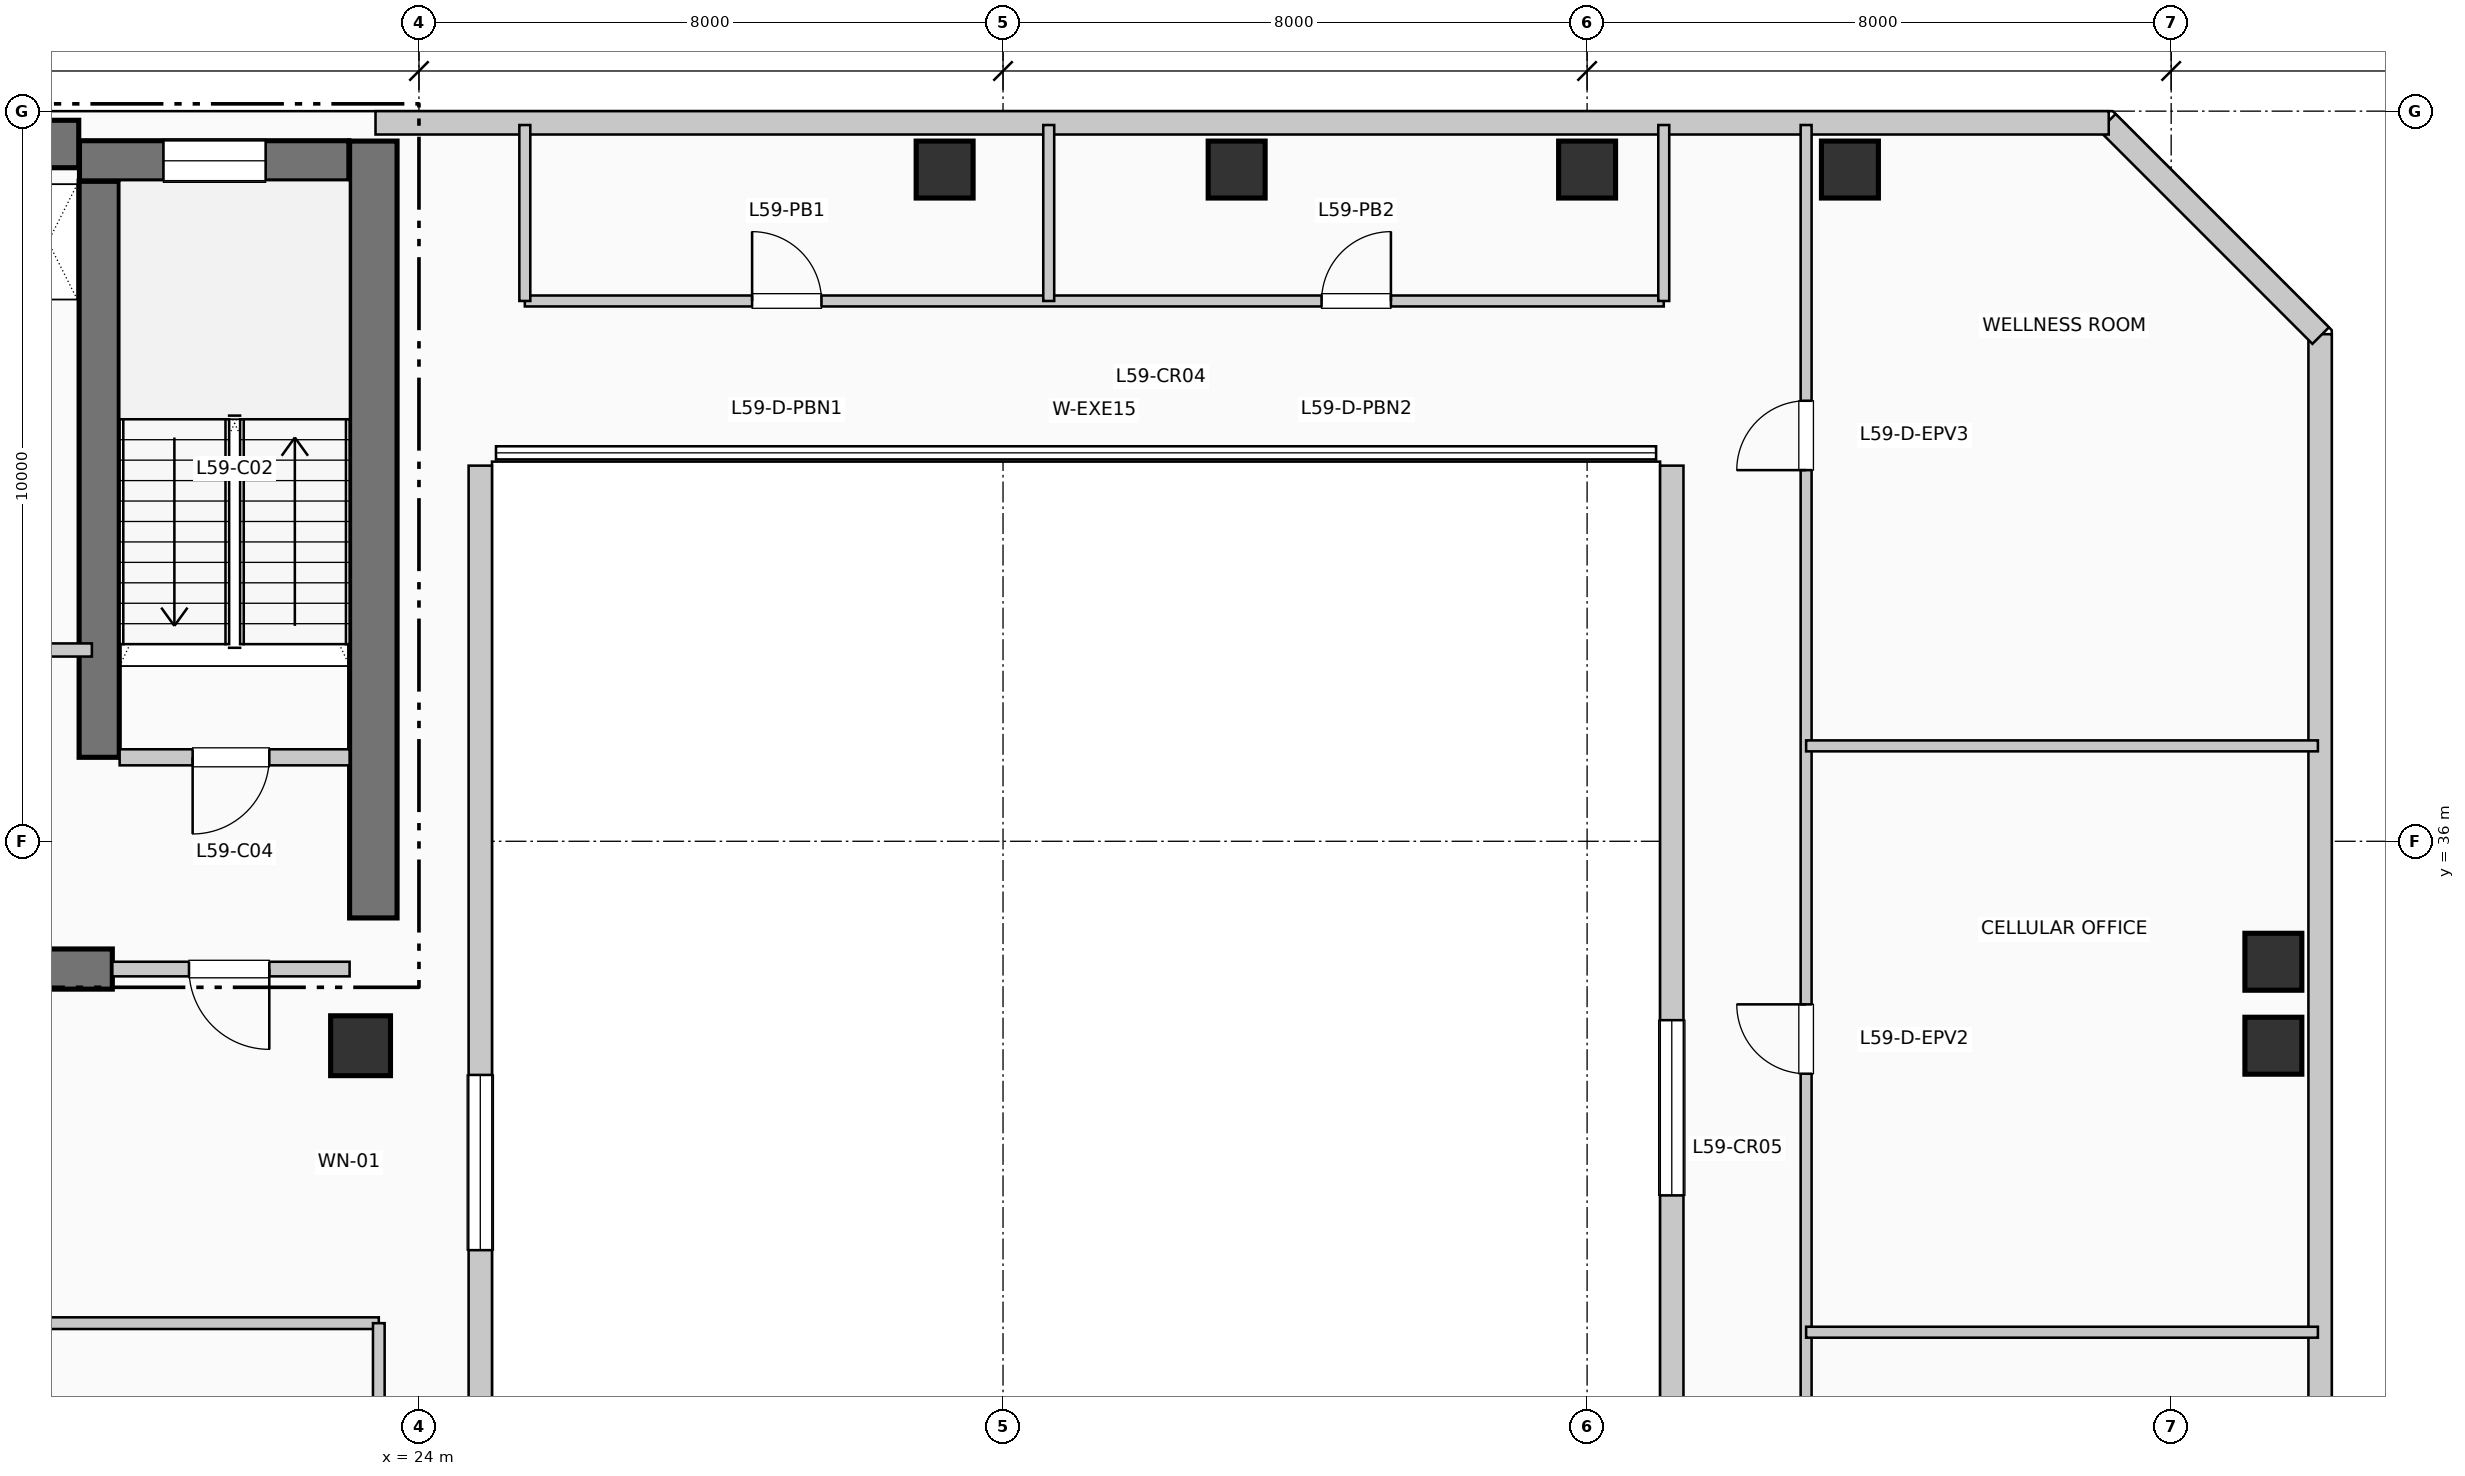
"""IFC4 building model, lengths in metres.
Left out: names, types, materials, properties, quantities, classifications, styles, units other than length and angle.
Written with IfcOpenShell. Run it as: python <this file> out.ifc"""

import sys

from ifc_helpers import new_model, si_unit, direction, frame, frame_2d, origin, origin_2d, place, context, subcontext, project, spatial, rectangle, extrude, element, fill, save


model = new_model("IFC4")
c1 = context("Model", 3, precision=1e-05, world=origin(), true_north=direction((0.0, 1.0)))
c2 = subcontext(c1, "Body", "Model", "MODEL_VIEW")
j1 = project(units=[si_unit("LENGTHUNIT", "METRE"), si_unit("PLANEANGLEUNIT", "RADIAN")], contexts=[c1])
p1 = place(None, origin())
s1 = spatial("IfcSite", under=j1, at=p1, CompositionType="ELEMENT")
p2 = place(p1, origin())
s2 = spatial("IfcBuilding", under=s1, at=p2, CompositionType="ELEMENT")
p3 = place(p2, frame((0.0, 0.0, 243.54)))
s3 = spatial("IfcBuildingStorey", under=s2, at=p3, CompositionType="ELEMENT", Elevation=243.54)
p4 = place(p3, frame((5.36, 45.55, 0.0), z_axis=(0.0, 0.0, 1.0), x_axis=(1.0, 0.0, 0.0)))
e1 = element("IfcWall", 1, at=p4, inside=s3, PredefinedType="SHEAR", context=c2, shape_type="SweptSolid", body=[
    extrude(rectangle(XDim=13.98, YDim=0.65, at=frame_2d((6.99, 0.0))), origin(), (0.0, 0.0, 1.0), 3.96),
])
p5 = place(p3, frame((23.375, 34.95, 0.0), z_axis=(0.0, 0.0, 1.0), x_axis=(0.0, 1.0, 0.0)))
e2 = element("IfcWall", 2, at=p5, inside=s3, PredefinedType="SHEAR", context=c2, shape_type="SweptSolid", body=[
    extrude(rectangle(XDim=10.64, YDim=0.65, at=frame_2d((5.32, 0.0))), origin(), (0.0, 0.0, 1.0), 3.96),
])
p6 = place(p3, frame((13.68, 34.25, 0.0), z_axis=(0.0, 0.0, 1.0), x_axis=(1.0, 0.0, 0.0)))
e3 = element("IfcWall", 3, at=p6, inside=s3, PredefinedType="SHEAR", context=c2, shape_type="SweptSolid", body=[
    extrude(rectangle(XDim=6.12, YDim=0.55, at=frame_2d((3.06, 0.0))), origin(), (0.0, 0.0, 1.0), 3.96),
])
p7 = place(p3, frame((19.62, 37.15, 0.0), z_axis=(0.0, 0.0, 1.0), x_axis=(0.0, 1.0, 0.0)))
e4 = element("IfcWall", 4, at=p7, inside=s3, PredefinedType="SHEAR", context=c2, shape_type="SweptSolid", body=[
    extrude(rectangle(XDim=7.89, YDim=0.55, at=frame_2d((3.945, 0.0))), origin(), (0.0, 0.0, 1.0), 3.96),
])
p8 = place(p3, frame((19.35, 45.32, 0.0), z_axis=(0.0, 0.0, 1.0), x_axis=(1.0, 0.0, 0.0)))
e5 = element("IfcWall", 5, at=p8, inside=s3, PredefinedType="SHEAR", context=c2, shape_type="SweptSolid", body=[
    extrude(rectangle(XDim=3.69, YDim=0.55, at=frame_2d((1.845, 0.0))), origin(), (0.0, 0.0, 1.0), 3.96),
])
p9 = place(p8, frame((1.15, 0.0, 1.05)))
e6 = element("IfcOpeningElement", 6, at=p9, cuts=e5, PredefinedType="OPENING", context=c2, shape_type="SweptSolid", body=[
    extrude(rectangle(XDim=1.4, YDim=1.8, at=frame_2d((0.7, 0.9))), frame((0.0, 0.285, 0.0), z_axis=(0.0, -1.0, 0.0), x_axis=(1.0, 0.0, 0.0)), (0.0, 0.0, 1.0), 0.57),
])
p10 = place(p3, frame((23.2, 33.2, 0.0), z_axis=(0.0, 0.0, 1.0), x_axis=(1.0, 0.0, 0.0)))
e7 = element("IfcColumn", 7, at=p10, inside=s3, PredefinedType="COLUMN", context=c2, shape_type="SweptSolid", body=[
    extrude(rectangle(XDim=0.82, YDim=0.82, at=origin_2d()), origin(), (0.0, 0.0, 1.0), 3.96),
])
for number, where, z_axis, x_axis in (
    (8, (31.2, 45.2, 0.0), (0.0, 0.0, 1.0), (1.0, 0.0, 0.0)),
    (9, (35.2, 45.2, 0.0), (0.0, 0.0, 1.0), (1.0, 0.0, 0.0)),
    (10, (40.0, 45.2, 0.0), (0.0, 0.0, 1.0), (1.0, 0.0, 0.0)),
    (11, (43.6, 45.2, 0.0), (0.0, 0.0, 1.0), (1.0, 0.0, 0.0)),
    (12, (49.4, 33.2, 0.0), (0.0, 0.0, 1.0), (1.0, 0.0, 0.0)),
    (13, (49.4, 34.35, 0.0), (0.0, 0.0, 1.0), (1.0, 0.0, 0.0)),
):
    element("IfcColumn", number, at=place(p3, frame(where, z_axis=z_axis, x_axis=x_axis)), inside=s3, PredefinedType="COLUMN", context=c2, shape_type="SweptSolid", body=[
        extrude(rectangle(XDim=0.78, YDim=0.78, at=origin_2d()), origin(), (0.0, 0.0, 1.0), 3.96),
    ])
p11 = place(p3, frame((24.84, 22.055, 0.0), z_axis=(0.0, 0.0, 1.0), x_axis=(0.0, 1.0, 0.0)))
e14 = element("IfcWall", 14, at=p11, inside=s3, PredefinedType="SOLIDWALL", context=c2, shape_type="SweptSolid", body=[
    extrude(rectangle(XDim=19.09, YDim=0.32, at=frame_2d((9.545, 0.0))), origin(), (0.0, 0.0, 1.0), 3.71),
])
p12 = place(p11, frame((8.345, 0.0, 0.85)))
e15 = element("IfcOpeningElement", 15, at=p12, cuts=e14, PredefinedType="OPENING", context=c2, shape_type="SweptSolid", body=[
    extrude(rectangle(XDim=2.4, YDim=2.05, at=frame_2d((1.2, 1.025))), frame((0.0, 0.17, 0.0), z_axis=(0.0, -1.0, 0.0), x_axis=(1.0, 0.0, 0.0)), (0.0, 0.0, 1.0), 0.34),
])
p13 = place(p3, frame((41.16, 41.145, 0.0), z_axis=(0.0, 0.0, 1.0), x_axis=(0.0, -1.0, 0.0)))
e16 = element("IfcWall", 16, at=p13, inside=s3, PredefinedType="SOLIDWALL", context=c2, shape_type="SweptSolid", body=[
    extrude(rectangle(XDim=17.59, YDim=0.32, at=frame_2d((8.795, 0.0))), origin(), (0.0, 0.0, 1.0), 3.71),
])
p14 = place(p13, frame((7.595, 0.0, 0.85)))
e17 = element("IfcOpeningElement", 17, at=p14, cuts=e16, PredefinedType="OPENING", context=c2, shape_type="SweptSolid", body=[
    extrude(rectangle(XDim=2.4, YDim=2.05, at=frame_2d((1.2, 1.025))), frame((0.0, 0.17, 0.0), z_axis=(0.0, -1.0, 0.0), x_axis=(1.0, 0.0, 0.0)), (0.0, 0.0, 1.0), 0.34),
])
p15 = place(p3, frame((50.04, 25.055, 0.0), z_axis=(0.0, 0.0, 1.0), x_axis=(0.0, 1.0, 0.0)))
e18 = element("IfcWall", 18, at=p15, inside=s3, PredefinedType="SOLIDWALL", context=c2, shape_type="SweptSolid", body=[
    extrude(rectangle(XDim=17.89, YDim=0.32, at=frame_2d((8.945, 0.0))), origin(), (0.0, 0.0, 1.0), 3.71),
])
p16 = place(p3, frame((50.048, 42.926, 0.0), z_axis=(0.0, 0.0, 1.0), x_axis=(-0.707136318428, 0.707077242712, 0.0)))
e19 = element("IfcWall", 19, at=p16, inside=s3, PredefinedType="SOLIDWALL", context=c2, shape_type="SweptSolid", body=[
    extrude(rectangle(XDim=4.133, YDim=0.32, at=frame_2d((2.066, 0.0))), origin(), (0.0, 0.0, 1.0), 3.71),
])
p17 = place(p3, frame((47.145, 45.84, 0.0), z_axis=(0.0, 0.0, 1.0), x_axis=(-1.0, 0.0, 0.0)))
e20 = element("IfcWall", 20, at=p17, inside=s3, PredefinedType="SOLIDWALL", context=c2, shape_type="SweptSolid", body=[
    extrude(rectangle(XDim=23.74, YDim=0.32, at=frame_2d((11.87, 0.0))), origin(), (0.0, 0.0, 1.0), 3.71),
])
p18 = place(p3, frame((19.9, 37.15, 0.0), z_axis=(0.0, 0.0, 1.0), x_axis=(1.0, 0.0, 0.0)))
e21 = element("IfcWall", 21, at=p18, inside=s3, PredefinedType="PARTITIONING", context=c2, shape_type="SweptSolid", body=[
    extrude(rectangle(XDim=3.15, YDim=0.22, at=frame_2d((1.575, 0.0))), origin(), (0.0, 0.0, 1.0), 3.71),
])
p19 = place(p18, frame((2.05, 0.0, 0.0), z_axis=(0.0, 0.0, 1.0), x_axis=(-1.0, 0.0, 0.0)))
e22 = element("IfcOpeningElement", 22, at=p19, cuts=e21, PredefinedType="OPENING", context=c2, shape_type="SweptSolid", body=[
    extrude(rectangle(XDim=1.05, YDim=2.15, at=frame_2d((0.525, 1.075))), frame((0.0, 0.12, 0.0), z_axis=(0.0, -1.0, 0.0), x_axis=(1.0, 0.0, 0.0)), (0.0, 0.0, 1.0), 0.24),
])
p20 = place(p3, frame((19.8, 34.25, 0.0), z_axis=(0.0, 0.0, 1.0), x_axis=(1.0, 0.0, 0.0)))
e23 = element("IfcWall", 23, at=p20, inside=s3, PredefinedType="PARTITIONING", context=c2, shape_type="SweptSolid", body=[
    extrude(rectangle(XDim=3.25, YDim=0.2, at=frame_2d((1.625, 0.0))), origin(), (0.0, 0.0, 1.0), 3.71),
])
p21 = place(p20, frame((2.15, 0.0, 0.0), z_axis=(0.0, 0.0, 1.0), x_axis=(-1.0, 0.0, 0.0)))
e24 = element("IfcOpeningElement", 24, at=p21, cuts=e23, PredefinedType="OPENING", context=c2, shape_type="SweptSolid", body=[
    extrude(rectangle(XDim=1.1, YDim=2.15, at=frame_2d((0.55, 1.075))), frame((0.0, 0.11, 0.0), z_axis=(0.0, -1.0, 0.0), x_axis=(1.0, 0.0, 0.0)), (0.0, 0.0, 1.0), 0.22),
])
p22 = place(p3, frame((17.68, 38.62, 0.0), z_axis=(0.0, 0.0, 1.0), x_axis=(1.0, 0.0, 0.0)))
e25 = element("IfcWall", 25, at=p22, inside=s3, PredefinedType="PARTITIONING", context=c2, shape_type="SweptSolid", body=[
    extrude(rectangle(XDim=1.84, YDim=0.18, at=frame_2d((0.92, 0.0))), origin(), (0.0, 0.0, 1.0), 3.71),
])
p23 = place(p22, frame((0.24, 0.0, 0.0)))
e26 = element("IfcOpeningElement", 26, at=p23, cuts=e25, PredefinedType="OPENING", context=c2, shape_type="SweptSolid", body=[
    extrude(rectangle(XDim=0.92, YDim=2.1, at=frame_2d((0.46, 1.05))), frame((0.0, 0.1, 0.0), z_axis=(0.0, -1.0, 0.0), x_axis=(1.0, 0.0, 0.0)), (0.0, 0.0, 1.0), 0.2),
])
p24 = place(p3, frame((9.04, 29.4, 0.0), z_axis=(0.0, 0.0, 1.0), x_axis=(1.0, 0.0, 0.0)))
e27 = element("IfcWall", 27, at=p24, inside=s3, PredefinedType="PARTITIONING", context=c2, shape_type="SweptSolid", body=[
    extrude(rectangle(XDim=14.41, YDim=0.16, at=frame_2d((7.205, 0.0))), origin(), (0.0, 0.0, 1.0), 3.365),
])
p25 = place(p3, frame((23.45, 6.84, 0.0), z_axis=(0.0, 0.0, 1.0), x_axis=(0.0, 1.0, 0.0)))
e28 = element("IfcWall", 28, at=p25, inside=s3, PredefinedType="PARTITIONING", context=c2, shape_type="SweptSolid", body=[
    extrude(rectangle(XDim=22.56, YDim=0.16, at=frame_2d((11.28, 0.0))), origin(), (0.0, 0.0, 1.0), 3.095),
])
p26 = place(p3, frame((25.45, 43.4, 0.0), z_axis=(0.0, 0.0, 1.0), x_axis=(1.0, 0.0, 0.0)))
e29 = element("IfcWall", 29, at=p26, inside=s3, PredefinedType="PARTITIONING", context=c2, shape_type="SweptSolid", body=[
    extrude(rectangle(XDim=15.6, YDim=0.15, at=frame_2d((7.8, 0.0))), origin(), (0.0, 0.0, 1.0), 3.71),
])
p27 = place(p26, frame((3.113, 0.0, 0.0)))
e30 = element("IfcOpeningElement", 30, at=p27, cuts=e29, PredefinedType="OPENING", context=c2, shape_type="SweptSolid", body=[
    extrude(rectangle(XDim=0.95, YDim=2.15, at=frame_2d((0.475, 1.075))), frame((0.0, 0.085, 0.0), z_axis=(0.0, -1.0, 0.0), x_axis=(1.0, 0.0, 0.0)), (0.0, 0.0, 1.0), 0.17),
])
p28 = place(p26, frame((10.913, 0.0, 0.0)))
e31 = element("IfcOpeningElement", 31, at=p28, cuts=e29, PredefinedType="OPENING", context=c2, shape_type="SweptSolid", body=[
    extrude(rectangle(XDim=0.95, YDim=2.15, at=frame_2d((0.475, 1.075))), frame((0.0, 0.085, 0.0), z_axis=(0.0, -1.0, 0.0), x_axis=(1.0, 0.0, 0.0)), (0.0, 0.0, 1.0), 0.17),
])
for number, where, z_axis, x_axis in (
    (32, (25.45, 43.4, 0.0), (0.0, 0.0, 1.0), (0.0, 1.0, 0.0)),
    (33, (41.05, 43.4, 0.0), (0.0, 0.0, 1.0), (0.0, 1.0, 0.0)),
    (34, (32.626, 43.4, 0.0), (0.0, 0.0, 1.0), (0.0, 1.0, 0.0)),
):
    element("IfcWall", number, at=place(p3, frame(where, z_axis=z_axis, x_axis=x_axis)), inside=s3, PredefinedType="PARTITIONING", context=c2, shape_type="SweptSolid", body=[
        extrude(rectangle(XDim=2.41, YDim=0.15, at=frame_2d((1.205, 0.0))), origin(), (0.0, 0.0, 1.0), 3.71),
    ])
p29 = place(p3, frame((43.0, 22.19, 0.0), z_axis=(0.0, 0.0, 1.0), x_axis=(0.0, 1.0, 0.0)))
e35 = element("IfcWall", 35, at=p29, inside=s3, PredefinedType="PARTITIONING", context=c2, shape_type="SweptSolid", body=[
    extrude(rectangle(XDim=23.62, YDim=0.15, at=frame_2d((11.81, 0.0))), origin(), (0.0, 0.0, 1.0), 3.71),
])
p30 = place(p29, frame((3.068, 0.0, 0.0)))
e36 = element("IfcOpeningElement", 36, at=p30, cuts=e35, PredefinedType="OPENING", context=c2, shape_type="SweptSolid", body=[
    extrude(rectangle(XDim=0.95, YDim=2.15, at=frame_2d((0.475, 1.075))), frame((0.0, 0.085, 0.0), z_axis=(0.0, -1.0, 0.0), x_axis=(1.0, 0.0, 0.0)), (0.0, 0.0, 1.0), 0.17),
])
p31 = place(p29, frame((10.626, 0.0, 0.0)))
e37 = element("IfcOpeningElement", 37, at=p31, cuts=e35, PredefinedType="OPENING", context=c2, shape_type="SweptSolid", body=[
    extrude(rectangle(XDim=0.95, YDim=2.15, at=frame_2d((0.475, 1.075))), frame((0.0, 0.085, 0.0), z_axis=(0.0, -1.0, 0.0), x_axis=(1.0, 0.0, 0.0)), (0.0, 0.0, 1.0), 0.17),
])
p32 = place(p29, frame((18.893, 0.0, 0.0)))
e38 = element("IfcOpeningElement", 38, at=p32, cuts=e35, PredefinedType="OPENING", context=c2, shape_type="SweptSolid", body=[
    extrude(rectangle(XDim=0.95, YDim=2.15, at=frame_2d((0.475, 1.075))), frame((0.0, 0.085, 0.0), z_axis=(0.0, -1.0, 0.0), x_axis=(1.0, 0.0, 0.0)), (0.0, 0.0, 1.0), 0.17),
])
for number, where, z_axis, x_axis in (
    (39, (43.0, 29.276, 0.0), (0.0, 0.0, 1.0), (1.0, 0.0, 0.0)),
    (40, (43.0, 37.307, 0.0), (0.0, 0.0, 1.0), (1.0, 0.0, 0.0)),
):
    element("IfcWall", number, at=place(p3, frame(where, z_axis=z_axis, x_axis=x_axis)), inside=s3, PredefinedType="PARTITIONING", context=c2, shape_type="SweptSolid", body=[
        extrude(rectangle(XDim=7.01, YDim=0.15, at=frame_2d((3.505, 0.0))), origin(), (0.0, 0.0, 1.0), 3.71),
    ])
p33 = place(p9, origin())
e41 = element("IfcWindow", 41, at=p33, inside=s3, PartitioningType="SINGLE_PANEL", PredefinedType="WINDOW", context=c2, shape_type="SweptSolid", body=[
    extrude(rectangle(XDim=1.4, YDim=1.8, at=frame_2d((0.7, 0.9))), frame((0.0, 0.03, 0.0), z_axis=(0.0, -1.0, 0.0), x_axis=(1.0, 0.0, 0.0)), (0.0, 0.0, 1.0), 0.06),
])
fill(e6, e41)
p34 = place(p12, origin())
e42 = element("IfcWindow", 42, at=p34, inside=s3, PartitioningType="SINGLE_PANEL", PredefinedType="WINDOW", context=c2, shape_type="SweptSolid", body=[
    extrude(rectangle(XDim=2.4, YDim=2.05, at=frame_2d((1.2, 1.025))), frame((0.0, 0.03, 0.0), z_axis=(0.0, -1.0, 0.0), x_axis=(1.0, 0.0, 0.0)), (0.0, 0.0, 1.0), 0.06),
])
fill(e15, e42)
p35 = place(p14, origin())
e43 = element("IfcWindow", 43, at=p35, inside=s3, PartitioningType="SINGLE_PANEL", PredefinedType="WINDOW", context=c2, shape_type="SweptSolid", body=[
    extrude(rectangle(XDim=2.4, YDim=2.05, at=frame_2d((1.2, 1.025))), frame((0.0, 0.03, 0.0), z_axis=(0.0, -1.0, 0.0), x_axis=(1.0, 0.0, 0.0)), (0.0, 0.0, 1.0), 0.06),
])
fill(e17, e43)
p36 = place(p19, origin())
e44 = element("IfcDoor", 44, at=p36, inside=s3, OperationType="SINGLE_SWING_LEFT", PredefinedType="DOOR", context=c2, shape_type="SweptSolid", body=[
    extrude(rectangle(XDim=1.05, YDim=2.15, at=frame_2d((0.525, 1.075))), frame((0.0, 0.025, 0.0), z_axis=(0.0, -1.0, 0.0), x_axis=(1.0, 0.0, 0.0)), (0.0, 0.0, 1.0), 0.05),
])
fill(e22, e44)
p37 = place(p21, origin())
e45 = element("IfcDoor", 45, at=p37, inside=s3, OperationType="SINGLE_SWING_RIGHT", PredefinedType="DOOR", context=c2, shape_type="SweptSolid", body=[
    extrude(rectangle(XDim=1.1, YDim=2.15, at=frame_2d((0.55, 1.075))), frame((0.0, 0.025, 0.0), z_axis=(0.0, -1.0, 0.0), x_axis=(1.0, 0.0, 0.0)), (0.0, 0.0, 1.0), 0.05),
])
fill(e24, e45)
p38 = place(p27, origin())
e46 = element("IfcDoor", 46, at=p38, inside=s3, OperationType="SINGLE_SWING_LEFT", PredefinedType="DOOR", context=c2, shape_type="SweptSolid", body=[
    extrude(rectangle(XDim=0.95, YDim=2.15, at=frame_2d((0.475, 1.075))), frame((0.0, 0.025, 0.0), z_axis=(0.0, -1.0, 0.0), x_axis=(1.0, 0.0, 0.0)), (0.0, 0.0, 1.0), 0.05),
])
fill(e30, e46)
p39 = place(p28, origin())
e47 = element("IfcDoor", 47, at=p39, inside=s3, OperationType="SINGLE_SWING_RIGHT", PredefinedType="DOOR", context=c2, shape_type="SweptSolid", body=[
    extrude(rectangle(XDim=0.95, YDim=2.15, at=frame_2d((0.475, 1.075))), frame((0.0, 0.025, 0.0), z_axis=(0.0, -1.0, 0.0), x_axis=(1.0, 0.0, 0.0)), (0.0, 0.0, 1.0), 0.05),
])
fill(e31, e47)
p40 = place(p31, origin())
e48 = element("IfcDoor", 48, at=p40, inside=s3, OperationType="SINGLE_SWING_RIGHT", PredefinedType="DOOR", context=c2, shape_type="SweptSolid", body=[
    extrude(rectangle(XDim=0.95, YDim=2.15, at=frame_2d((0.475, 1.075))), frame((0.0, 0.025, 0.0), z_axis=(0.0, -1.0, 0.0), x_axis=(1.0, 0.0, 0.0)), (0.0, 0.0, 1.0), 0.05),
])
fill(e37, e48)
p41 = place(p32, origin())
e49 = element("IfcDoor", 49, at=p41, inside=s3, OperationType="SINGLE_SWING_LEFT", PredefinedType="DOOR", context=c2, shape_type="SweptSolid", body=[
    extrude(rectangle(XDim=0.95, YDim=2.15, at=frame_2d((0.475, 1.075))), frame((0.0, 0.025, 0.0), z_axis=(0.0, -1.0, 0.0), x_axis=(1.0, 0.0, 0.0)), (0.0, 0.0, 1.0), 0.05),
])
fill(e38, e49)
save(model, sys.argv[1])
